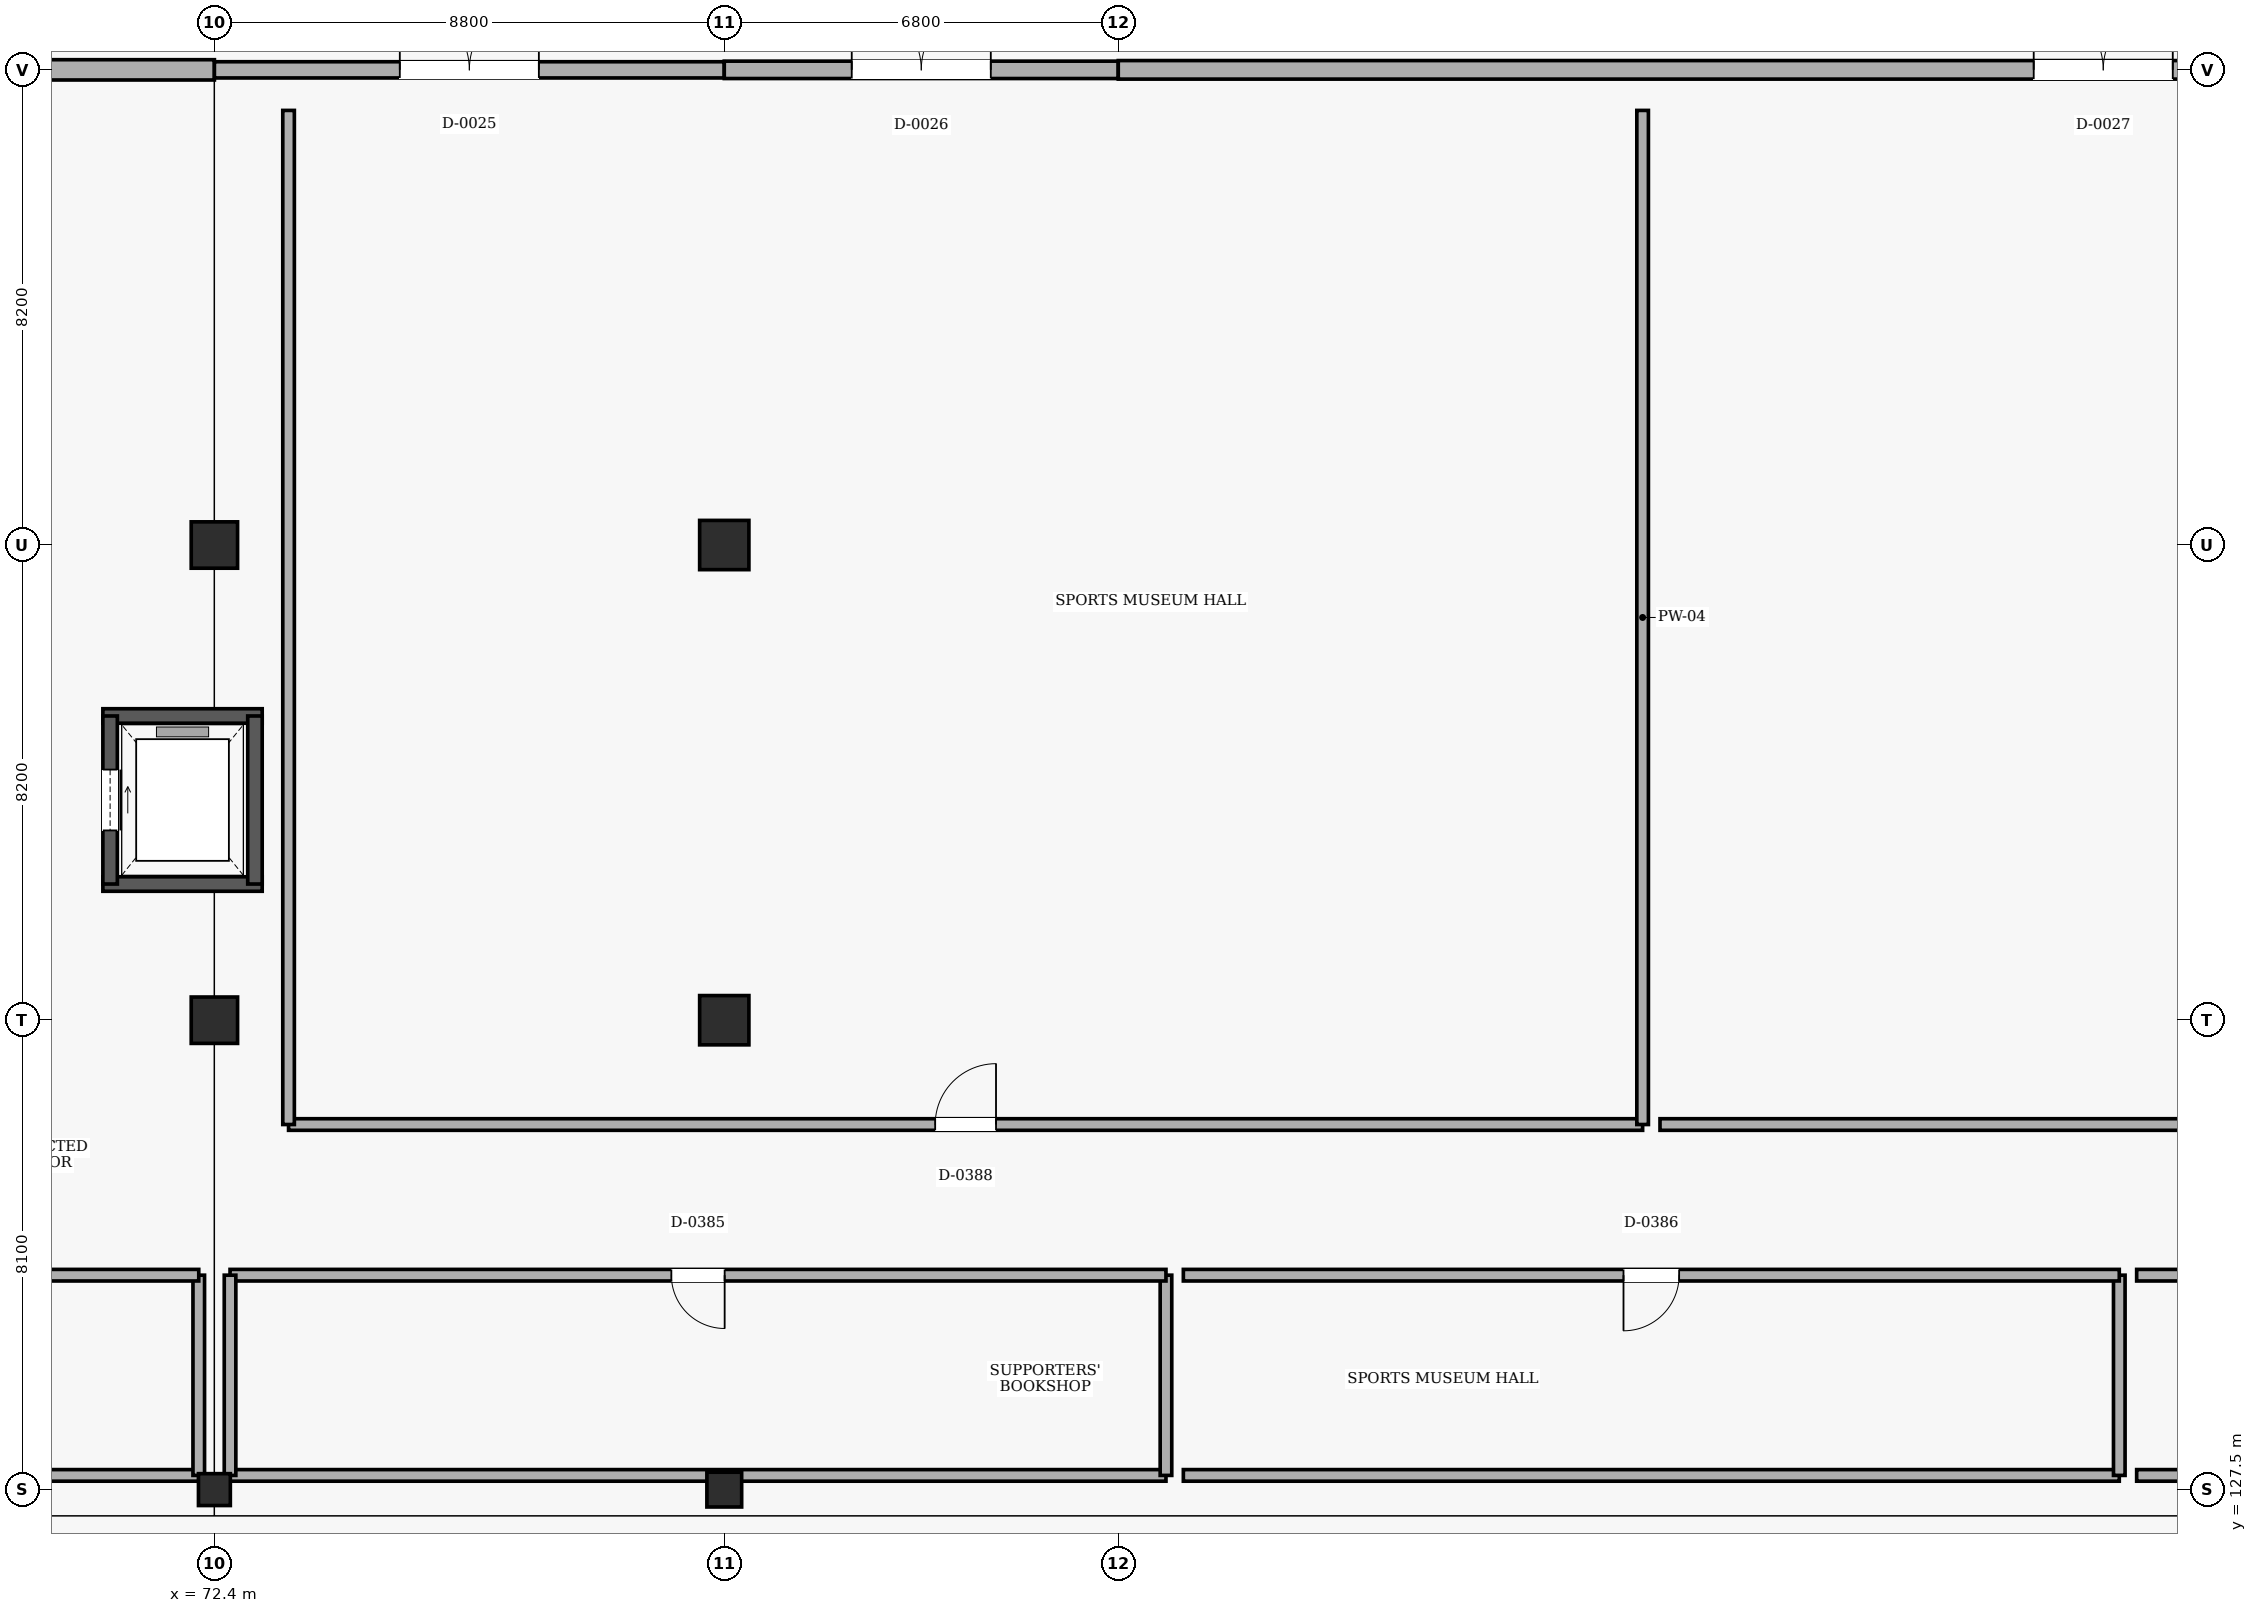
"""IFC4 building model, lengths in metres.
Left out: names, types, materials, properties, quantities, classifications, styles, units other than length and angle.
Written with IfcOpenShell. Run it as: python <this file> out.ifc"""

import sys

from ifc_helpers import new_model, si_unit, direction, frame, frame_2d, origin, origin_2d, place, context, subcontext, project, spatial, rectangle, extrude, element, fill, save


model = new_model("IFC4")
c1 = context("Model", 3, precision=1e-05, world=origin(), true_north=direction((0.0, 1.0)))
c2 = subcontext(c1, "Body", "Model", "MODEL_VIEW")
j1 = project(units=[si_unit("LENGTHUNIT", "METRE"), si_unit("PLANEANGLEUNIT", "RADIAN")], contexts=[c1])
p1 = place(None, origin())
s1 = spatial("IfcSite", under=j1, at=p1, CompositionType="ELEMENT")
p2 = place(p1, origin())
s2 = spatial("IfcBuilding", under=s1, at=p2, CompositionType="ELEMENT")
p3 = place(p2, origin())
s3 = spatial("IfcBuildingStorey", under=s2, at=p3, CompositionType="ELEMENT", Elevation=0.0)
p4 = place(p3, frame((72.4, 127.5, 0.0), z_axis=(0.0, 0.0, 1.0), x_axis=(1.0, 0.0, 0.0)))
e1 = element("IfcColumn", 1, at=p4, inside=s3, PredefinedType="COLUMN", context=c2, shape_type="SweptSolid", body=[
    extrude(rectangle(XDim=0.55, YDim=0.55, at=origin_2d()), origin(), (0.0, 0.0, 1.0), 5.4),
])
for number, where, z_axis, x_axis in (
    (2, (72.4, 135.6, 0.0), (0.0, 0.0, 1.0), (1.0, 0.0, 0.0)),
    (3, (72.4, 143.8, 0.0), (0.0, 0.0, 1.0), (1.0, 0.0, 0.0)),
):
    element("IfcColumn", number, at=place(p3, frame(where, z_axis=z_axis, x_axis=x_axis)), inside=s3, PredefinedType="COLUMN", context=c2, shape_type="SweptSolid", body=[
        extrude(rectangle(XDim=0.8, YDim=0.8, at=origin_2d()), origin(), (0.0, 0.0, 1.0), 5.4),
    ])
p5 = place(p3, frame((81.2, 127.5, 0.0), z_axis=(0.0, 0.0, 1.0), x_axis=(1.0, 0.0, 0.0)))
e4 = element("IfcColumn", 4, at=p5, inside=s3, PredefinedType="COLUMN", context=c2, shape_type="SweptSolid", body=[
    extrude(rectangle(XDim=0.6, YDim=0.6, at=origin_2d()), origin(), (0.0, 0.0, 1.0), 5.4),
])
for number, where, z_axis, x_axis in (
    (5, (81.2, 135.6, 0.0), (0.0, 0.0, 1.0), (1.0, 0.0, 0.0)),
    (6, (81.2, 143.8, 0.0), (0.0, 0.0, 1.0), (1.0, 0.0, 0.0)),
):
    element("IfcColumn", number, at=place(p3, frame(where, z_axis=z_axis, x_axis=x_axis)), inside=s3, PredefinedType="COLUMN", context=c2, shape_type="SweptSolid", body=[
        extrude(rectangle(XDim=0.85, YDim=0.85, at=origin_2d()), origin(), (0.0, 0.0, 1.0), 5.4),
    ])
p6 = place(p3, frame((63.6, 152.0, 0.0), z_axis=(0.0, 0.0, 1.0), x_axis=(1.0, 0.0, 0.0)))
e7 = element("IfcWall", 7, at=p6, inside=s3, PredefinedType="SOLIDWALL", context=c2, shape_type="SweptSolid", body=[
    extrude(rectangle(XDim=8.8, YDim=0.35, at=frame_2d((4.4, 0.0))), origin(), (0.0, 0.0, 1.0), 5.08),
])
p7 = place(p6, frame((3.2, 0.0, 0.0)))
e8 = element("IfcOpeningElement", 8, at=p7, cuts=e7, PredefinedType="OPENING", context=c2, shape_type="SweptSolid", body=[
    extrude(rectangle(XDim=2.4, YDim=2.2, at=frame_2d((1.2, 1.1))), frame((0.0, 0.185, 0.0), z_axis=(0.0, -1.0, 0.0), x_axis=(1.0, 0.0, 0.0)), (0.0, 0.0, 1.0), 0.37),
])
p8 = place(p3, frame((72.4, 152.0, 0.0), z_axis=(0.0, 0.0, 1.0), x_axis=(1.0, 0.0, 0.0)))
e9 = element("IfcWall", 9, at=p8, inside=s3, PredefinedType="SOLIDWALL", context=c2, shape_type="SweptSolid", body=[
    extrude(rectangle(XDim=8.8, YDim=0.28, at=frame_2d((4.4, 0.0))), origin(), (0.0, 0.0, 1.0), 5.08),
])
p9 = place(p8, frame((3.2, 0.0, 0.0)))
e10 = element("IfcOpeningElement", 10, at=p9, cuts=e9, PredefinedType="OPENING", context=c2, shape_type="SweptSolid", body=[
    extrude(rectangle(XDim=2.4, YDim=2.2, at=frame_2d((1.2, 1.1))), frame((0.0, 0.15, 0.0), z_axis=(0.0, -1.0, 0.0), x_axis=(1.0, 0.0, 0.0)), (0.0, 0.0, 1.0), 0.3),
])
p10 = place(p3, frame((81.2, 152.0, 0.0), z_axis=(0.0, 0.0, 1.0), x_axis=(1.0, 0.0, 0.0)))
e11 = element("IfcWall", 11, at=p10, inside=s3, PredefinedType="SOLIDWALL", context=c2, shape_type="SweptSolid", body=[
    extrude(rectangle(XDim=6.8, YDim=0.3, at=frame_2d((3.4, 0.0))), origin(), (0.0, 0.0, 1.0), 5.08),
])
p11 = place(p10, frame((2.2, 0.0, 0.0)))
e12 = element("IfcOpeningElement", 12, at=p11, cuts=e11, PredefinedType="OPENING", context=c2, shape_type="SweptSolid", body=[
    extrude(rectangle(XDim=2.4, YDim=2.2, at=frame_2d((1.2, 1.1))), frame((0.0, 0.16, 0.0), z_axis=(0.0, -1.0, 0.0), x_axis=(1.0, 0.0, 0.0)), (0.0, 0.0, 1.0), 0.32),
])
p12 = place(p3, frame((88.0, 152.0, 0.0), z_axis=(0.0, 0.0, 1.0), x_axis=(1.0, 0.0, 0.0)))
e13 = element("IfcWall", 13, at=p12, inside=s3, PredefinedType="SOLIDWALL", context=c2, shape_type="SweptSolid", body=[
    extrude(rectangle(XDim=34.0, YDim=0.32, at=frame_2d((17.0, 0.0))), origin(), (0.0, 0.0, 1.0), 5.08),
])
p13 = place(p12, frame((15.8, 0.0, 0.0)))
e14 = element("IfcOpeningElement", 14, at=p13, cuts=e13, PredefinedType="OPENING", context=c2, shape_type="SweptSolid", body=[
    extrude(rectangle(XDim=2.4, YDim=2.2, at=frame_2d((1.2, 1.1))), frame((0.0, 0.17, 0.0), z_axis=(0.0, -1.0, 0.0), x_axis=(1.0, 0.0, 0.0)), (0.0, 0.0, 1.0), 0.34),
])
for number, where, z_axis, x_axis in (
    (15, (70.475, 137.95, 0.0), (0.0, 0.0, 1.0), (1.0, 0.0, 0.0)),
    (16, (73.225, 140.85, 0.0), (0.0, 0.0, 1.0), (-1.0, 0.0, 0.0)),
):
    element("IfcWall", number, at=place(p3, frame(where, z_axis=z_axis, x_axis=x_axis)), inside=s3, PredefinedType="SHEAR", context=c2, shape_type="SweptSolid", body=[
        extrude(rectangle(XDim=2.75, YDim=0.25, at=frame_2d((1.375, 0.0))), origin(), (0.0, 0.0, 1.0), 5.08),
    ])
p14 = place(p3, frame((70.6, 140.85, 0.0), z_axis=(0.0, 0.0, 1.0), x_axis=(0.0, -1.0, 0.0)))
e17 = element("IfcWall", 17, at=p14, inside=s3, PredefinedType="SHEAR", context=c2, shape_type="SweptSolid", body=[
    extrude(rectangle(XDim=2.9, YDim=0.25, at=frame_2d((1.45, 0.0))), origin(), (0.0, 0.0, 1.0), 5.08),
])
p15 = place(p14, frame((0.925, 0.0, 0.0)))
e18 = element("IfcOpeningElement", 18, at=p15, cuts=e17, PredefinedType="OPENING", context=c2, shape_type="SweptSolid", body=[
    extrude(rectangle(XDim=1.05, YDim=2.15, at=frame_2d((0.525, 1.075))), frame((0.0, 0.135, 0.0), z_axis=(0.0, -1.0, 0.0), x_axis=(1.0, 0.0, 0.0)), (0.0, 0.0, 1.0), 0.27),
])
p16 = place(p3, frame((73.1, 137.95, 0.0), z_axis=(0.0, 0.0, 1.0), x_axis=(0.0, 1.0, 0.0)))
e19 = element("IfcWall", 19, at=p16, inside=s3, PredefinedType="SHEAR", context=c2, shape_type="SweptSolid", body=[
    extrude(rectangle(XDim=2.9, YDim=0.25, at=frame_2d((1.45, 0.0))), origin(), (0.0, 0.0, 1.0), 5.08),
])
p17 = place(p3, frame((48.712, 127.745, 0.0), z_axis=(0.0, 0.0, 1.0), x_axis=(1.0, 0.0, 0.0)))
e20 = element("IfcWall", 20, at=p17, inside=s3, PredefinedType="PARTITIONING", context=c2, shape_type="SweptSolid", body=[
    extrude(rectangle(XDim=23.417, YDim=0.2, at=frame_2d((11.709, 0.0))), origin(), (0.0, 0.0, 1.0), 4.21),
])
p18 = place(p3, frame((72.13, 127.745, 0.0), z_axis=(0.0, 0.0, 1.0), x_axis=(0.0, 1.0, 0.0)))
e21 = element("IfcWall", 21, at=p18, inside=s3, PredefinedType="PARTITIONING", context=c2, shape_type="SweptSolid", body=[
    extrude(rectangle(XDim=3.455, YDim=0.2, at=frame_2d((1.728, 0.0))), origin(), (0.0, 0.0, 1.0), 4.31),
])
p19 = place(p3, frame((72.13, 131.2, 0.0), z_axis=(0.0, 0.0, 1.0), x_axis=(-1.0, 0.0, 0.0)))
e22 = element("IfcWall", 22, at=p19, inside=s3, PredefinedType="PARTITIONING", context=c2, shape_type="SweptSolid", body=[
    extrude(rectangle(XDim=23.417, YDim=0.2, at=frame_2d((11.709, 0.0))), origin(), (0.0, 0.0, 1.0), 5.08),
])
p20 = place(p19, frame((10.629, 0.0, 0.0)))
e23 = element("IfcOpeningElement", 23, at=p20, cuts=e22, PredefinedType="OPENING", context=c2, shape_type="SweptSolid", body=[
    extrude(rectangle(XDim=2.16, YDim=2.35, at=frame_2d((1.08, 1.175))), frame((0.0, 0.11, 0.0), z_axis=(0.0, -1.0, 0.0), x_axis=(1.0, 0.0, 0.0)), (0.0, 0.0, 1.0), 0.22),
])
p21 = place(p3, frame((72.67, 127.745, 0.0), z_axis=(0.0, 0.0, 1.0), x_axis=(1.0, 0.0, 0.0)))
e24 = element("IfcWall", 24, at=p21, inside=s3, PredefinedType="PARTITIONING", context=c2, shape_type="SweptSolid", body=[
    extrude(rectangle(XDim=16.153, YDim=0.2, at=frame_2d((8.077, 0.0))), origin(), (0.0, 0.0, 1.0), 4.26),
])
p22 = place(p3, frame((88.823, 127.745, 0.0), z_axis=(0.0, 0.0, 1.0), x_axis=(0.0, 1.0, 0.0)))
e25 = element("IfcWall", 25, at=p22, inside=s3, PredefinedType="PARTITIONING", context=c2, shape_type="SweptSolid", body=[
    extrude(rectangle(XDim=3.455, YDim=0.2, at=frame_2d((1.728, 0.0))), origin(), (0.0, 0.0, 1.0), 5.08),
])
p23 = place(p3, frame((88.823, 131.2, 0.0), z_axis=(0.0, 0.0, 1.0), x_axis=(-1.0, 0.0, 0.0)))
e26 = element("IfcWall", 26, at=p23, inside=s3, PredefinedType="PARTITIONING", context=c2, shape_type="SweptSolid", body=[
    extrude(rectangle(XDim=16.153, YDim=0.2, at=frame_2d((8.077, 0.0))), origin(), (0.0, 0.0, 1.0), 5.08),
])
p24 = place(p23, frame((7.617, 0.0, 0.0)))
e27 = element("IfcOpeningElement", 27, at=p24, cuts=e26, PredefinedType="OPENING", context=c2, shape_type="SweptSolid", body=[
    extrude(rectangle(XDim=0.92, YDim=2.1, at=frame_2d((0.46, 1.05))), frame((0.0, 0.11, 0.0), z_axis=(0.0, -1.0, 0.0), x_axis=(1.0, 0.0, 0.0)), (0.0, 0.0, 1.0), 0.22),
])
p25 = place(p3, frame((72.67, 131.2, 0.0), z_axis=(0.0, 0.0, 1.0), x_axis=(0.0, -1.0, 0.0)))
e28 = element("IfcWall", 28, at=p25, inside=s3, PredefinedType="PARTITIONING", context=c2, shape_type="SweptSolid", body=[
    extrude(rectangle(XDim=3.455, YDim=0.2, at=frame_2d((1.728, 0.0))), origin(), (0.0, 0.0, 1.0), 4.31),
])
p26 = place(p3, frame((89.123, 127.745, 0.0), z_axis=(0.0, 0.0, 1.0), x_axis=(1.0, 0.0, 0.0)))
e29 = element("IfcWall", 29, at=p26, inside=s3, PredefinedType="PARTITIONING", context=c2, shape_type="SweptSolid", body=[
    extrude(rectangle(XDim=16.153, YDim=0.2, at=frame_2d((8.077, 0.0))), origin(), (0.0, 0.0, 1.0), 5.08),
])
p27 = place(p3, frame((105.277, 127.745, 0.0), z_axis=(0.0, 0.0, 1.0), x_axis=(0.0, 1.0, 0.0)))
e30 = element("IfcWall", 30, at=p27, inside=s3, PredefinedType="PARTITIONING", context=c2, shape_type="SweptSolid", body=[
    extrude(rectangle(XDim=3.455, YDim=0.2, at=frame_2d((1.728, 0.0))), origin(), (0.0, 0.0, 1.0), 5.08),
])
p28 = place(p3, frame((105.277, 131.2, 0.0), z_axis=(0.0, 0.0, 1.0), x_axis=(-1.0, 0.0, 0.0)))
e31 = element("IfcWall", 31, at=p28, inside=s3, PredefinedType="PARTITIONING", context=c2, shape_type="SweptSolid", body=[
    extrude(rectangle(XDim=16.153, YDim=0.2, at=frame_2d((8.077, 0.0))), origin(), (0.0, 0.0, 1.0), 5.08),
])
p29 = place(p28, frame((7.597, 0.0, 0.0)))
e32 = element("IfcOpeningElement", 32, at=p29, cuts=e31, PredefinedType="OPENING", context=c2, shape_type="SweptSolid", body=[
    extrude(rectangle(XDim=0.96, YDim=2.1, at=frame_2d((0.48, 1.05))), frame((0.0, 0.11, 0.0), z_axis=(0.0, -1.0, 0.0), x_axis=(1.0, 0.0, 0.0)), (0.0, 0.0, 1.0), 0.22),
])
p30 = place(p3, frame((105.577, 127.745, 0.0), z_axis=(0.0, 0.0, 1.0), x_axis=(1.0, 0.0, 0.0)))
e33 = element("IfcWall", 33, at=p30, inside=s3, PredefinedType="PARTITIONING", context=c2, shape_type="SweptSolid", body=[
    extrude(rectangle(XDim=16.153, YDim=0.2, at=frame_2d((8.077, 0.0))), origin(), (0.0, 0.0, 1.0), 5.08),
])
p31 = place(p3, frame((121.73, 131.2, 0.0), z_axis=(0.0, 0.0, 1.0), x_axis=(-1.0, 0.0, 0.0)))
e34 = element("IfcWall", 34, at=p31, inside=s3, PredefinedType="PARTITIONING", context=c2, shape_type="SweptSolid", body=[
    extrude(rectangle(XDim=16.153, YDim=0.2, at=frame_2d((8.077, 0.0))), origin(), (0.0, 0.0, 1.0), 5.08),
])
p32 = place(p31, frame((7.577, 0.0, 0.0)))
e35 = element("IfcOpeningElement", 35, at=p32, cuts=e34, PredefinedType="OPENING", context=c2, shape_type="SweptSolid", body=[
    extrude(rectangle(XDim=1.0, YDim=2.1, at=frame_2d((0.5, 1.05))), frame((0.0, 0.11, 0.0), z_axis=(0.0, -1.0, 0.0), x_axis=(1.0, 0.0, 0.0)), (0.0, 0.0, 1.0), 0.22),
])
p33 = place(p3, frame((73.68, 133.8, 0.0), z_axis=(0.0, 0.0, 1.0), x_axis=(1.0, 0.0, 0.0)))
e36 = element("IfcWall", 36, at=p33, inside=s3, PredefinedType="PARTITIONING", context=c2, shape_type="SweptSolid", body=[
    extrude(rectangle(XDim=23.37, YDim=0.2, at=frame_2d((11.685, 0.0))), origin(), (0.0, 0.0, 1.0), 5.08),
])
p34 = place(p33, frame((11.16, 0.0, 0.0)))
e37 = element("IfcOpeningElement", 37, at=p34, cuts=e36, PredefinedType="OPENING", context=c2, shape_type="SweptSolid", body=[
    extrude(rectangle(XDim=1.05, YDim=2.15, at=frame_2d((0.525, 1.075))), frame((0.0, 0.11, 0.0), z_axis=(0.0, -1.0, 0.0), x_axis=(1.0, 0.0, 0.0)), (0.0, 0.0, 1.0), 0.22),
])
for number, where, z_axis, x_axis in (
    (38, (97.05, 133.8, 0.0), (0.0, 0.0, 1.0), (0.0, 1.0, 0.0)),
    (39, (73.68, 151.3, 0.0), (0.0, 0.0, 1.0), (0.0, -1.0, 0.0)),
):
    element("IfcWall", number, at=place(p3, frame(where, z_axis=z_axis, x_axis=x_axis)), inside=s3, PredefinedType="PARTITIONING", context=c2, shape_type="SweptSolid", body=[
        extrude(rectangle(XDim=17.5, YDim=0.2, at=frame_2d((8.75, 0.0))), origin(), (0.0, 0.0, 1.0), 5.08),
    ])
p35 = place(p3, frame((97.35, 133.8, 0.0), z_axis=(0.0, 0.0, 1.0), x_axis=(1.0, 0.0, 0.0)))
e40 = element("IfcWall", 40, at=p35, inside=s3, PredefinedType="PARTITIONING", context=c2, shape_type="SweptSolid", body=[
    extrude(rectangle(XDim=24.38, YDim=0.2, at=frame_2d((12.19, 0.0))), origin(), (0.0, 0.0, 1.0), 5.08),
])
p36 = place(p35, frame((11.63, 0.0, 0.0)))
e41 = element("IfcOpeningElement", 41, at=p36, cuts=e40, PredefinedType="OPENING", context=c2, shape_type="SweptSolid", body=[
    extrude(rectangle(XDim=1.12, YDim=2.15, at=frame_2d((0.56, 1.075))), frame((0.0, 0.11, 0.0), z_axis=(0.0, -1.0, 0.0), x_axis=(1.0, 0.0, 0.0)), (0.0, 0.0, 1.0), 0.22),
])
p37 = place(p9, origin())
e42 = element("IfcDoor", 42, at=p37, inside=s3, OperationType="DOUBLE_DOOR_SINGLE_SWING", PredefinedType="DOOR", context=c2, shape_type="SweptSolid", body=[
    extrude(rectangle(XDim=2.4, YDim=2.2, at=frame_2d((1.2, 1.1))), frame((0.0, 0.025, 0.0), z_axis=(0.0, -1.0, 0.0), x_axis=(1.0, 0.0, 0.0)), (0.0, 0.0, 1.0), 0.05),
])
fill(e10, e42)
p38 = place(p11, origin())
e43 = element("IfcDoor", 43, at=p38, inside=s3, OperationType="DOUBLE_DOOR_SINGLE_SWING", PredefinedType="DOOR", context=c2, shape_type="SweptSolid", body=[
    extrude(rectangle(XDim=2.4, YDim=2.2, at=frame_2d((1.2, 1.1))), frame((0.0, 0.025, 0.0), z_axis=(0.0, -1.0, 0.0), x_axis=(1.0, 0.0, 0.0)), (0.0, 0.0, 1.0), 0.05),
])
fill(e12, e43)
p39 = place(p13, origin())
e44 = element("IfcDoor", 44, at=p39, inside=s3, OperationType="DOUBLE_DOOR_SINGLE_SWING", PredefinedType="DOOR", context=c2, shape_type="SweptSolid", body=[
    extrude(rectangle(XDim=2.4, YDim=2.2, at=frame_2d((1.2, 1.1))), frame((0.0, 0.025, 0.0), z_axis=(0.0, -1.0, 0.0), x_axis=(1.0, 0.0, 0.0)), (0.0, 0.0, 1.0), 0.05),
])
fill(e14, e44)
p40 = place(p15, origin())
e45 = element("IfcDoor", 45, at=p40, inside=s3, OperationType="SLIDING_TO_RIGHT", PredefinedType="DOOR", context=c2, shape_type="SweptSolid", body=[
    extrude(rectangle(XDim=1.05, YDim=2.15, at=frame_2d((0.525, 1.075))), frame((0.0, 0.025, 0.0), z_axis=(0.0, -1.0, 0.0), x_axis=(1.0, 0.0, 0.0)), (0.0, 0.0, 1.0), 0.05),
])
fill(e18, e45)
p41 = place(p24, origin())
e46 = element("IfcDoor", 46, at=p41, inside=s3, OperationType="SINGLE_SWING_LEFT", PredefinedType="DOOR", context=c2, shape_type="SweptSolid", body=[
    extrude(rectangle(XDim=0.92, YDim=2.1, at=frame_2d((0.46, 1.05))), frame((0.0, 0.025, 0.0), z_axis=(0.0, -1.0, 0.0), x_axis=(1.0, 0.0, 0.0)), (0.0, 0.0, 1.0), 0.05),
])
fill(e27, e46)
p42 = place(p29, origin())
e47 = element("IfcDoor", 47, at=p42, inside=s3, OperationType="SINGLE_SWING_RIGHT", PredefinedType="DOOR", context=c2, shape_type="SweptSolid", body=[
    extrude(rectangle(XDim=0.96, YDim=2.1, at=frame_2d((0.48, 1.05))), frame((0.0, 0.025, 0.0), z_axis=(0.0, -1.0, 0.0), x_axis=(1.0, 0.0, 0.0)), (0.0, 0.0, 1.0), 0.05),
])
fill(e32, e47)
p43 = place(p34, origin())
e48 = element("IfcDoor", 48, at=p43, inside=s3, OperationType="SINGLE_SWING_RIGHT", PredefinedType="DOOR", context=c2, shape_type="SweptSolid", body=[
    extrude(rectangle(XDim=1.05, YDim=2.15, at=frame_2d((0.525, 1.075))), frame((0.0, 0.025, 0.0), z_axis=(0.0, -1.0, 0.0), x_axis=(1.0, 0.0, 0.0)), (0.0, 0.0, 1.0), 0.05),
])
fill(e37, e48)
save(model, sys.argv[1])
